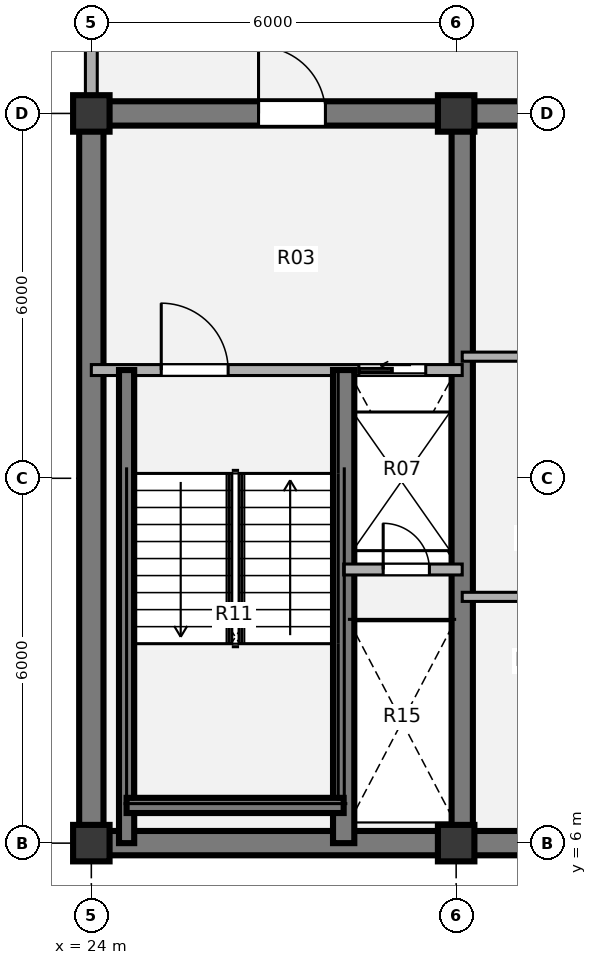
"""IFC4 building model, lengths in metres.
Left out: names, types, materials, properties, quantities, classifications, styles, units other than length and angle.
Written with IfcOpenShell. Run it as: python <this file> out.ifc"""

import sys

from ifc_helpers import new_model, si_unit, direction, frame, frame_2d, origin, origin_2d, place, context, subcontext, project, spatial, rectangle, extrude, source, transform, mapped, element, fill, save


model = new_model("IFC4")
c1 = context("Model", 3, precision=1e-05, world=origin(), true_north=direction((0.0, 1.0)))
c2 = subcontext(c1, "Body", "Model", "MODEL_VIEW")
j1 = project(units=[si_unit("LENGTHUNIT", "METRE"), si_unit("PLANEANGLEUNIT", "RADIAN")], contexts=[c1])
p1 = place(None, origin())
s1 = spatial("IfcSite", under=j1, at=p1, CompositionType="ELEMENT")
p2 = place(p1, origin())
s2 = spatial("IfcBuilding", under=s1, at=p2, CompositionType="ELEMENT")
p3 = place(p2, frame((0.0, 0.0, 299.88)))
s3 = spatial("IfcBuildingStorey", under=s2, at=p3, CompositionType="ELEMENT", Elevation=299.88)
m1 = source(origin(), c2, "Body", "SweptSolid", [
    extrude(rectangle(XDim=0.6, YDim=0.6, at=origin_2d()), origin(), (0.0, 0.0, 1.0), 3.96),
])
for number, where, z_axis, x_axis in (
    (1, (24.0, 6.0, 0.0), (0.0, 0.0, 1.0), (1.0, 0.0, 0.0)),
    (2, (30.0, 6.0, 0.0), (0.0, 0.0, 1.0), (1.0, 0.0, 0.0)),
    (3, (24.0, 18.0, 0.0), (0.0, 0.0, 1.0), (1.0, 0.0, 0.0)),
    (4, (30.0, 18.0, 0.0), (0.0, 0.0, 1.0), (1.0, 0.0, 0.0)),
):
    element("IfcColumn", number, at=place(p3, frame(where, z_axis=z_axis, x_axis=x_axis)), inside=s3, PredefinedType="COLUMN", context=c2, shape_type="MappedRepresentation", body=[
        mapped(m1, transform((0.0, 0.0, 0.0), x_axis=(1.0, 0.0, 0.0), y_axis=(0.0, 1.0, 0.0), z_axis=(0.0, 0.0, 1.0), scale=1.0)),
    ])
p4 = place(p3, frame((48.2, 6.0, 0.0), z_axis=(0.0, 0.0, 1.0), x_axis=(-1.0, 0.0, 0.0)))
e5 = element("IfcWall", 5, at=p4, inside=s3, PredefinedType="SHEAR", context=c2, shape_type="SweptSolid", body=[
    extrude(rectangle(XDim=24.4, YDim=0.4, at=frame_2d((12.2, 0.0))), origin(), (0.0, 0.0, 1.0), 3.96),
])
p5 = place(p3, frame((24.0, 6.0, 0.0), z_axis=(0.0, 0.0, 1.0), x_axis=(0.0, 1.0, 0.0)))
e6 = element("IfcWall", 6, at=p5, inside=s3, PredefinedType="SHEAR", context=c2, shape_type="SweptSolid", body=[
    extrude(rectangle(XDim=12.0, YDim=0.4, at=frame_2d((6.0, 0.0))), origin(), (0.0, 0.0, 1.0), 3.96),
])
p6 = place(p3, frame((23.8, 18.0, 0.0), z_axis=(0.0, 0.0, 1.0), x_axis=(1.0, 0.0, 0.0)))
e7 = element("IfcWall", 7, at=p6, inside=s3, PredefinedType="SHEAR", context=c2, shape_type="SweptSolid", body=[
    extrude(rectangle(XDim=9.4, YDim=0.4, at=frame_2d((4.7, 0.0))), origin(), (0.0, 0.0, 1.0), 3.96),
])
p7 = place(p6, frame((2.95, 0.0, 0.0)))
e8 = element("IfcOpeningElement", 8, at=p7, cuts=e7, PredefinedType="OPENING", context=c2, shape_type="SweptSolid", body=[
    extrude(rectangle(XDim=1.1, YDim=2.1, at=origin_2d()), frame((0.55, 0.21, 1.05), z_axis=(0.0, -1.0, 0.0), x_axis=(1.0, 0.0, 0.0)), (0.0, 0.0, 1.0), 0.42),
])
p8 = place(p3, frame((30.1, 6.0, 0.0), z_axis=(0.0, 0.0, 1.0), x_axis=(0.0, 1.0, 0.0)))
e9 = element("IfcWall", 9, at=p8, inside=s3, PredefinedType="SHEAR", context=c2, shape_type="SweptSolid", body=[
    extrude(rectangle(XDim=12.0, YDim=0.35, at=frame_2d((6.0, 0.0))), origin(), (0.0, 0.0, 1.0), 3.96),
])
p9 = place(p3, frame((24.0, 18.28, 0.0), z_axis=(0.0, 0.0, 1.0), x_axis=(0.0, 1.0, 0.0)))
e10 = element("IfcWall", 10, at=p9, inside=s3, PredefinedType="SOLIDWALL", context=c2, shape_type="SweptSolid", body=[
    extrude(rectangle(XDim=2.77, YDim=0.195, at=frame_2d((1.385, 0.0))), origin(), (0.0, 0.0, 1.0), 2.898),
])
for number, where, z_axis, x_axis in (
    (11, (30.1, 14.0, 0.0), (0.0, 0.0, 1.0), (1.0, 0.0, 0.0)),
    (12, (30.1, 10.05, 0.0), (0.0, 0.0, 1.0), (1.0, 0.0, 0.0)),
):
    element("IfcWall", number, at=place(p3, frame(where, z_axis=z_axis, x_axis=x_axis)), inside=s3, PredefinedType="PARTITIONING", context=c2, shape_type="SweptSolid", body=[
        extrude(rectangle(XDim=2.5, YDim=0.15, at=frame_2d((1.25, 0.0))), origin(), (0.0, 0.0, 1.0), 3.68),
    ])
p10 = place(p3, frame((24.0, 13.78, 0.0), z_axis=(0.0, 0.0, 1.0), x_axis=(1.0, 0.0, 0.0)))
e13 = element("IfcWall", 13, at=p10, inside=s3, PredefinedType="PARTITIONING", context=c2, shape_type="SweptSolid", body=[
    extrude(rectangle(XDim=6.1, YDim=0.18, at=frame_2d((3.05, 0.0))), origin(), (0.0, 0.0, 1.0), 3.68),
])
p11 = place(p10, frame((1.15, 0.0, 0.0)))
e14 = element("IfcOpeningElement", 14, at=p11, cuts=e13, PredefinedType="OPENING", context=c2, shape_type="SweptSolid", body=[
    extrude(rectangle(XDim=1.1, YDim=2.1, at=origin_2d()), frame((0.55, 0.1, 1.05), z_axis=(0.0, -1.0, 0.0), x_axis=(1.0, 0.0, 0.0)), (0.0, 0.0, 1.0), 0.2),
])
p12 = place(p10, frame((4.4, 0.0, 0.0)))
e15 = element("IfcOpeningElement", 15, at=p12, cuts=e13, PredefinedType="OPENING", context=c2, shape_type="SweptSolid", body=[
    extrude(rectangle(XDim=1.1, YDim=2.1, at=origin_2d()), frame((0.55, 0.1, 1.05), z_axis=(0.0, -1.0, 0.0), x_axis=(1.0, 0.0, 0.0)), (0.0, 0.0, 1.0), 0.2),
])
p13 = place(p3, frame((28.15, 6.0, 0.0), z_axis=(0.0, 0.0, 1.0), x_axis=(0.0, 1.0, 0.0)))
e16 = element("IfcWall", 16, at=p13, inside=s3, PredefinedType="SHEAR", context=c2, shape_type="SweptSolid", body=[
    extrude(rectangle(XDim=7.78, YDim=0.35, at=frame_2d((3.89, 0.0))), origin(), (0.0, 0.0, 1.0), 4.03),
])
p14 = place(p3, frame((24.58, 6.0, 0.0), z_axis=(0.0, 0.0, 1.0), x_axis=(0.0, 1.0, 0.0)))
e17 = element("IfcWall", 17, at=p14, inside=s3, PredefinedType="SHEAR", context=c2, shape_type="SweptSolid", body=[
    extrude(rectangle(XDim=7.78, YDim=0.25, at=frame_2d((3.89, 0.0))), origin(), (0.0, 0.0, 1.0), 4.03),
])
p15 = place(p3, frame((24.58, 6.62, 0.0), z_axis=(0.0, 0.0, 1.0), x_axis=(1.0, 0.0, 0.0)))
e18 = element("IfcWall", 18, at=p15, inside=s3, PredefinedType="SHEAR", context=c2, shape_type="SweptSolid", body=[
    extrude(rectangle(XDim=3.57, YDim=0.25, at=frame_2d((1.785, 0.0))), origin(), (0.0, 0.0, 1.0), 4.03),
])
p16 = place(p3, frame((28.15, 10.5, 0.0), z_axis=(0.0, 0.0, 1.0), x_axis=(1.0, 0.0, 0.0)))
e19 = element("IfcWall", 19, at=p16, inside=s3, PredefinedType="PARTITIONING", context=c2, shape_type="SweptSolid", body=[
    extrude(rectangle(XDim=1.95, YDim=0.18, at=frame_2d((0.975, 0.0))), origin(), (0.0, 0.0, 1.0), 3.68),
])
p17 = place(p16, frame((0.65, 0.0, 0.0)))
e20 = element("IfcOpeningElement", 20, at=p17, cuts=e19, PredefinedType="OPENING", context=c2, shape_type="SweptSolid", body=[
    extrude(rectangle(XDim=0.76, YDim=2.05, at=origin_2d()), frame((0.38, 0.1, 1.025), z_axis=(0.0, -1.0, 0.0), x_axis=(1.0, 0.0, 0.0)), (0.0, 0.0, 1.0), 0.2),
])
m2 = source(origin(), c2, "Body", "SweptSolid", [
    extrude(rectangle(XDim=1.1, YDim=2.1, at=origin_2d()), frame((0.55, 0.025, 1.05), z_axis=(0.0, -1.0, 0.0), x_axis=(1.0, 0.0, 0.0)), (0.0, 0.0, 1.0), 0.05),
])
p18 = place(p11, origin())
e21 = element("IfcDoor", 21, at=p18, inside=s3, OperationType="SINGLE_SWING_LEFT", PredefinedType="DOOR", context=c2, shape_type="MappedRepresentation", body=[
    mapped(m2, transform((0.0, 0.0, 0.0), x_axis=(1.0, 0.0, 0.0), y_axis=(0.0, 1.0, 0.0), z_axis=(0.0, 0.0, 1.0), scale=1.0)),
])
fill(e14, e21)
m3 = source(origin(), c2, "Body", "SweptSolid", [
    extrude(rectangle(XDim=1.1, YDim=2.1, at=origin_2d()), frame((0.55, 0.025, 1.05), z_axis=(0.0, -1.0, 0.0), x_axis=(1.0, 0.0, 0.0)), (0.0, 0.0, 1.0), 0.05),
])
p19 = place(p12, origin())
e22 = element("IfcDoor", 22, at=p19, inside=s3, OperationType="SLIDING_TO_LEFT", PredefinedType="DOOR", context=c2, shape_type="MappedRepresentation", body=[
    mapped(m3, transform((0.0, 0.0, 0.0), x_axis=(1.0, 0.0, 0.0), y_axis=(0.0, 1.0, 0.0), z_axis=(0.0, 0.0, 1.0), scale=1.0)),
])
fill(e15, e22)
m4 = source(origin(), c2, "Body", "SweptSolid", [
    extrude(rectangle(XDim=0.76, YDim=2.05, at=origin_2d()), frame((0.38, 0.025, 1.025), z_axis=(0.0, -1.0, 0.0), x_axis=(1.0, 0.0, 0.0)), (0.0, 0.0, 1.0), 0.05),
])
p20 = place(p17, origin())
e23 = element("IfcDoor", 23, at=p20, inside=s3, OperationType="SINGLE_SWING_LEFT", PredefinedType="DOOR", context=c2, shape_type="MappedRepresentation", body=[
    mapped(m4, transform((0.0, 0.0, 0.0), x_axis=(1.0, 0.0, 0.0), y_axis=(0.0, 1.0, 0.0), z_axis=(0.0, 0.0, 1.0), scale=1.0)),
])
fill(e20, e23)
m5 = source(origin(), c2, "Body", "SweptSolid", [
    extrude(rectangle(XDim=1.1, YDim=2.1, at=origin_2d()), frame((0.55, 0.025, 1.05), z_axis=(0.0, -1.0, 0.0), x_axis=(1.0, 0.0, 0.0)), (0.0, 0.0, 1.0), 0.05),
])
p21 = place(p7, origin())
e24 = element("IfcDoor", 24, at=p21, inside=s3, OperationType="SINGLE_SWING_LEFT", PredefinedType="DOOR", context=c2, shape_type="MappedRepresentation", body=[
    mapped(m5, transform((0.0, 0.0, 0.0), x_axis=(1.0, 0.0, 0.0), y_axis=(0.0, 1.0, 0.0), z_axis=(0.0, 0.0, 1.0), scale=1.0)),
])
fill(e8, e24)
save(model, sys.argv[1])
